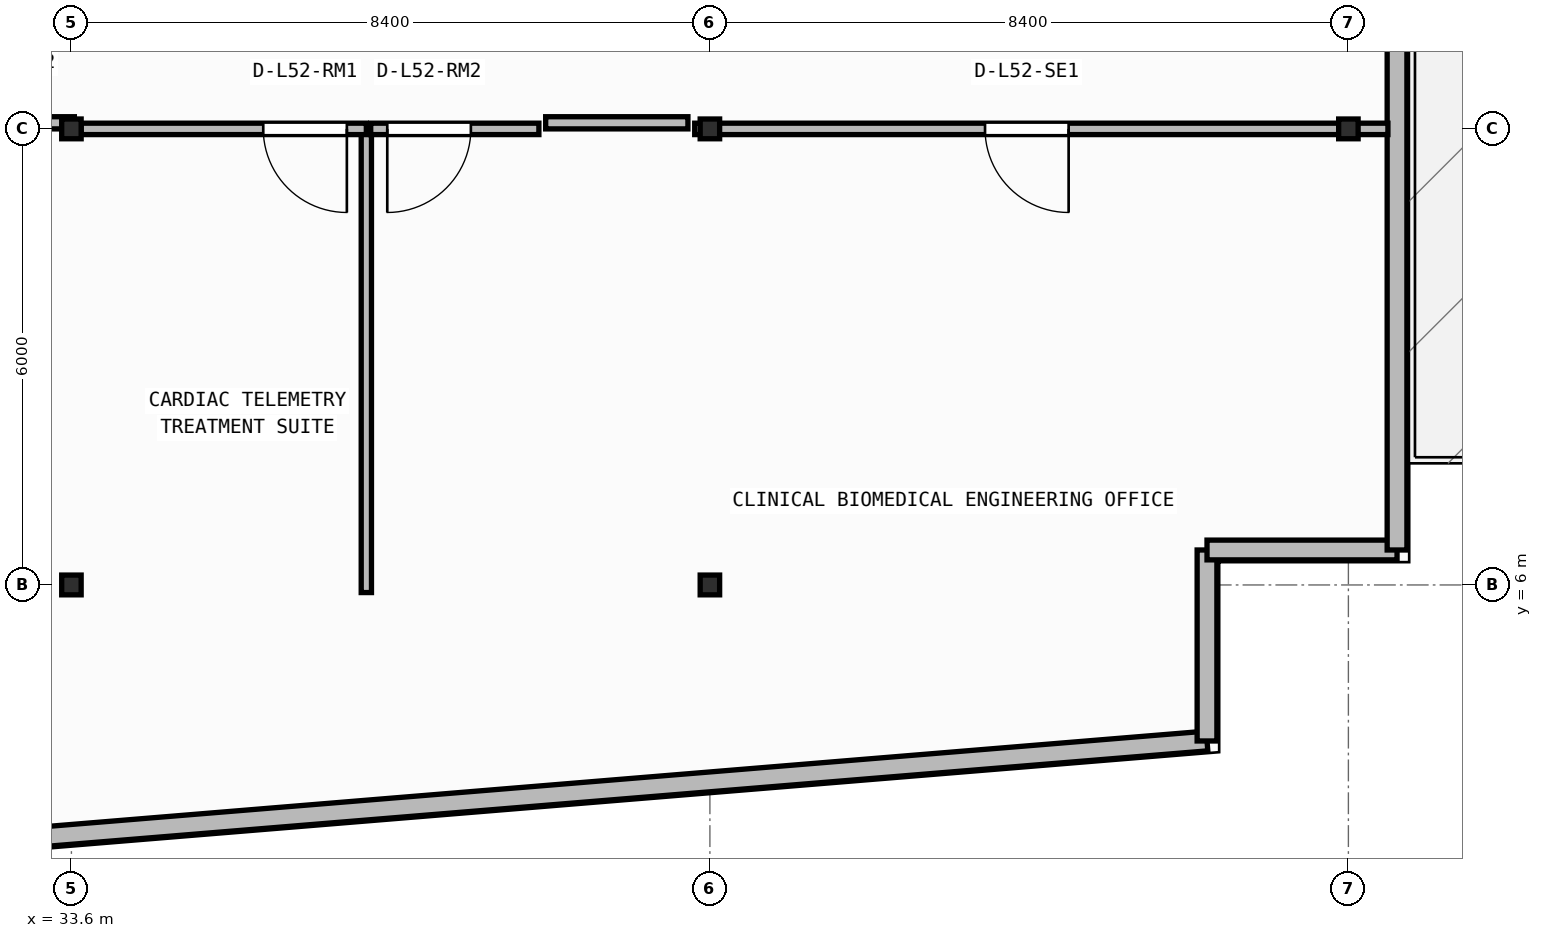
"""IFC4 building model, lengths in metres.
Left out: names, types, materials, properties, quantities, classifications, styles, units other than length and angle.
Written with IfcOpenShell. Run it as: python <this file> out.ifc"""

import sys

from ifc_helpers import new_model, si_unit, direction, frame, frame_2d, origin, origin_2d, place, context, subcontext, project, spatial, rectangle, i_section, extrude, element, fill, save


model = new_model("IFC4")
c1 = context("Model", 3, precision=1e-05, world=origin(), true_north=direction((0.0, 1.0)))
c2 = subcontext(c1, "Body", "Model", "MODEL_VIEW")
j1 = project(units=[si_unit("LENGTHUNIT", "METRE"), si_unit("PLANEANGLEUNIT", "RADIAN")], contexts=[c1])
p1 = place(None, origin())
s1 = spatial("IfcSite", under=j1, at=p1, CompositionType="ELEMENT")
p2 = place(p1, origin())
s2 = spatial("IfcBuilding", under=s1, at=p2, CompositionType="ELEMENT")
p3 = place(p2, frame((0.0, 0.0, 211.85)))
s3 = spatial("IfcBuildingStorey", under=s2, at=p3, CompositionType="ELEMENT", Elevation=211.85)
for number, where, z_axis, x_axis in (
    (1, (33.6, 6.0, 0.0), (0.0, 0.0, 1.0), (1.0, 0.0, 0.0)),
    (2, (42.0, 6.0, 0.0), (0.0, 0.0, 1.0), (1.0, 0.0, 0.0)),
    (3, (33.6, 12.0, 0.0), (0.0, 0.0, 1.0), (1.0, 0.0, 0.0)),
    (4, (42.0, 12.0, 0.0), (0.0, 0.0, 1.0), (1.0, 0.0, 0.0)),
    (5, (50.4, 12.0, 0.0), (0.0, 0.0, 1.0), (1.0, 0.0, 0.0)),
):
    element("IfcColumn", number, at=place(p3, frame(where, z_axis=z_axis, x_axis=x_axis)), inside=s3, PredefinedType="COLUMN", context=c2, shape_type="SweptSolid", body=[
        extrude(i_section(OverallWidth=0.256, OverallDepth=0.26, WebThickness=0.01, FlangeThickness=0.017, FilletRadius=0.013, at=origin_2d()), origin(), (0.0, 0.0, 1.0), 3.95),
    ])
p4 = place(p3, frame((2.66, 0.174, 0.0), z_axis=(0.0, 0.0, 1.0), x_axis=(0.996634028439, 0.081979347142, 0.0)))
e6 = element("IfcWall", 6, at=p4, inside=s3, PredefinedType="STANDARD", context=c2, shape_type="SweptSolid", body=[
    extrude(rectangle(XDim=46.035, YDim=0.26, at=frame_2d((23.018, 0.0))), origin(), (0.0, 0.0, 1.0), 3.71),
])
p5 = place(p4, frame((21.817, 0.0, 0.9)))
e7 = element("IfcOpeningElement", 7, at=p5, cuts=e6, PredefinedType="OPENING", context=c2, shape_type="SweptSolid", body=[
    extrude(rectangle(XDim=2.4, YDim=1.65, at=frame_2d((1.2, 0.825))), frame((0.0, 0.14, 0.0), z_axis=(0.0, -1.0, 0.0), x_axis=(1.0, 0.0, 0.0)), (0.0, 0.0, 1.0), 0.28),
])
p6 = place(p3, frame((48.54, 3.948, 0.0), z_axis=(0.0, 0.0, 1.0), x_axis=(0.0, 1.0, 0.0)))
e8 = element("IfcWall", 8, at=p6, inside=s3, PredefinedType="STANDARD", context=c2, shape_type="SweptSolid", body=[
    extrude(rectangle(XDim=2.512, YDim=0.26, at=frame_2d((1.256, 0.0))), origin(), (0.0, 0.0, 1.0), 3.71),
])
p7 = place(p3, frame((48.54, 6.46, 0.0), z_axis=(0.0, 0.0, 1.0), x_axis=(1.0, 0.0, 0.0)))
e9 = element("IfcWall", 9, at=p7, inside=s3, PredefinedType="STANDARD", context=c2, shape_type="SweptSolid", body=[
    extrude(rectangle(XDim=2.5, YDim=0.26, at=frame_2d((1.25, 0.0))), origin(), (0.0, 0.0, 1.0), 3.71),
])
p8 = place(p3, frame((51.04, 6.46, 0.0), z_axis=(0.0, 0.0, 1.0), x_axis=(0.0, 1.0, 0.0)))
e10 = element("IfcWall", 10, at=p8, inside=s3, PredefinedType="STANDARD", context=c2, shape_type="SweptSolid", body=[
    extrude(rectangle(XDim=22.68, YDim=0.26, at=frame_2d((11.34, 0.0))), origin(), (0.0, 0.0, 1.0), 3.71),
])
p9 = place(p8, frame((10.69, 0.0, 0.0)))
e11 = element("IfcOpeningElement", 11, at=p9, cuts=e10, PredefinedType="OPENING", context=c2, shape_type="SweptSolid", body=[
    extrude(rectangle(XDim=1.3, YDim=2.15, at=frame_2d((0.65, 1.075))), frame((0.0, 0.14, 0.0), z_axis=(0.0, -1.0, 0.0), x_axis=(1.0, 0.0, 0.0)), (0.0, 0.0, 1.0), 0.28),
])
p10 = place(p3, frame((37.48, 5.9, 0.0), z_axis=(0.0, 0.0, 1.0), x_axis=(0.0, 1.0, 0.0)))
e12 = element("IfcWall", 12, at=p10, inside=s3, PredefinedType="PARTITIONING", context=c2, shape_type="SweptSolid", body=[
    extrude(rectangle(XDim=6.1, YDim=0.135, at=frame_2d((3.05, 0.0))), origin(), (0.0, 0.0, 1.0), 3.71),
])
p11 = place(p3, frame((37.48, 12.0, 0.0), z_axis=(0.0, 0.0, 1.0), x_axis=(-1.0, 0.0, 0.0)))
e13 = element("IfcWall", 13, at=p11, inside=s3, PredefinedType="PARTITIONING", context=c2, shape_type="SweptSolid", body=[
    extrude(rectangle(XDim=3.752, YDim=0.15, at=frame_2d((1.876, 0.0))), origin(), (0.0, 0.0, 1.0), 3.152),
])
p12 = place(p11, frame((0.256, 0.0, 0.0)))
e14 = element("IfcOpeningElement", 14, at=p12, cuts=e13, PredefinedType="OPENING", context=c2, shape_type="SweptSolid", body=[
    extrude(rectangle(XDim=1.1, YDim=2.1, at=frame_2d((0.55, 1.05))), frame((0.0, 0.085, 0.0), z_axis=(0.0, -1.0, 0.0), x_axis=(1.0, 0.0, 0.0)), (0.0, 0.0, 1.0), 0.17),
])
p13 = place(p3, frame((39.75, 12.0, 0.0), z_axis=(0.0, 0.0, 1.0), x_axis=(-1.0, 0.0, 0.0)))
e15 = element("IfcWall", 15, at=p13, inside=s3, PredefinedType="PARTITIONING", context=c2, shape_type="SweptSolid", body=[
    extrude(rectangle(XDim=2.212, YDim=0.15, at=frame_2d((1.106, 0.0))), origin(), (0.0, 0.0, 1.0), 3.152),
])
p14 = place(p13, frame((0.895, 0.0, 0.0)))
e16 = element("IfcOpeningElement", 16, at=p14, cuts=e15, PredefinedType="OPENING", context=c2, shape_type="SweptSolid", body=[
    extrude(rectangle(XDim=1.1, YDim=2.1, at=frame_2d((0.55, 1.05))), frame((0.0, 0.085, 0.0), z_axis=(0.0, -1.0, 0.0), x_axis=(1.0, 0.0, 0.0)), (0.0, 0.0, 1.0), 0.17),
])
p15 = place(p3, frame((50.92, 12.0, 0.0), z_axis=(0.0, 0.0, 1.0), x_axis=(-1.0, 0.0, 0.0)))
e17 = element("IfcWall", 17, at=p15, inside=s3, PredefinedType="PARTITIONING", context=c2, shape_type="SweptSolid", body=[
    extrude(rectangle(XDim=9.12, YDim=0.15, at=frame_2d((4.56, 0.0))), origin(), (0.0, 0.0, 1.0), 3.152),
])
p16 = place(p15, frame((4.2, 0.0, 0.0)))
e18 = element("IfcOpeningElement", 18, at=p16, cuts=e17, PredefinedType="OPENING", context=c2, shape_type="SweptSolid", body=[
    extrude(rectangle(XDim=1.1, YDim=2.1, at=frame_2d((0.55, 1.05))), frame((0.0, 0.085, 0.0), z_axis=(0.0, -1.0, 0.0), x_axis=(1.0, 0.0, 0.0)), (0.0, 0.0, 1.0), 0.17),
])
p17 = place(p3, frame((31.439, 12.08, 0.0), z_axis=(0.0, 0.0, 1.0), x_axis=(1.0, 0.0, 0.0)))
e19 = element("IfcWall", 19, at=p17, inside=s3, PredefinedType="PARTITIONING", context=c2, shape_type="SweptSolid", body=[
    extrude(rectangle(XDim=2.199, YDim=0.16, at=frame_2d((1.1, 0.0))), origin(), (0.0, 0.0, 1.0), 3.152),
])
p18 = place(p3, frame((39.839, 12.08, 0.0), z_axis=(0.0, 0.0, 1.0), x_axis=(1.0, 0.0, 0.0)))
e20 = element("IfcWall", 20, at=p18, inside=s3, PredefinedType="PARTITIONING", context=c2, shape_type="SweptSolid", body=[
    extrude(rectangle(XDim=1.871, YDim=0.16, at=frame_2d((0.936, 0.0))), origin(), (0.0, 0.0, 1.0), 3.152),
])
p19 = place(p12, origin())
e21 = element("IfcDoor", 21, at=p19, inside=s3, OperationType="SINGLE_SWING_LEFT", PredefinedType="DOOR", context=c2, shape_type="SweptSolid", body=[
    extrude(rectangle(XDim=1.1, YDim=2.1, at=frame_2d((0.55, 1.05))), frame((0.0, 0.025, 0.0), z_axis=(0.0, -1.0, 0.0), x_axis=(1.0, 0.0, 0.0)), (0.0, 0.0, 1.0), 0.05),
])
fill(e14, e21)
p20 = place(p14, origin())
e22 = element("IfcDoor", 22, at=p20, inside=s3, OperationType="SINGLE_SWING_RIGHT", PredefinedType="DOOR", context=c2, shape_type="SweptSolid", body=[
    extrude(rectangle(XDim=1.1, YDim=2.1, at=frame_2d((0.55, 1.05))), frame((0.0, 0.025, 0.0), z_axis=(0.0, -1.0, 0.0), x_axis=(1.0, 0.0, 0.0)), (0.0, 0.0, 1.0), 0.05),
])
fill(e16, e22)
p21 = place(p16, origin())
e23 = element("IfcDoor", 23, at=p21, inside=s3, OperationType="SINGLE_SWING_LEFT", PredefinedType="DOOR", context=c2, shape_type="SweptSolid", body=[
    extrude(rectangle(XDim=1.1, YDim=2.1, at=frame_2d((0.55, 1.05))), frame((0.0, 0.025, 0.0), z_axis=(0.0, -1.0, 0.0), x_axis=(1.0, 0.0, 0.0)), (0.0, 0.0, 1.0), 0.05),
])
fill(e18, e23)
save(model, sys.argv[1])
